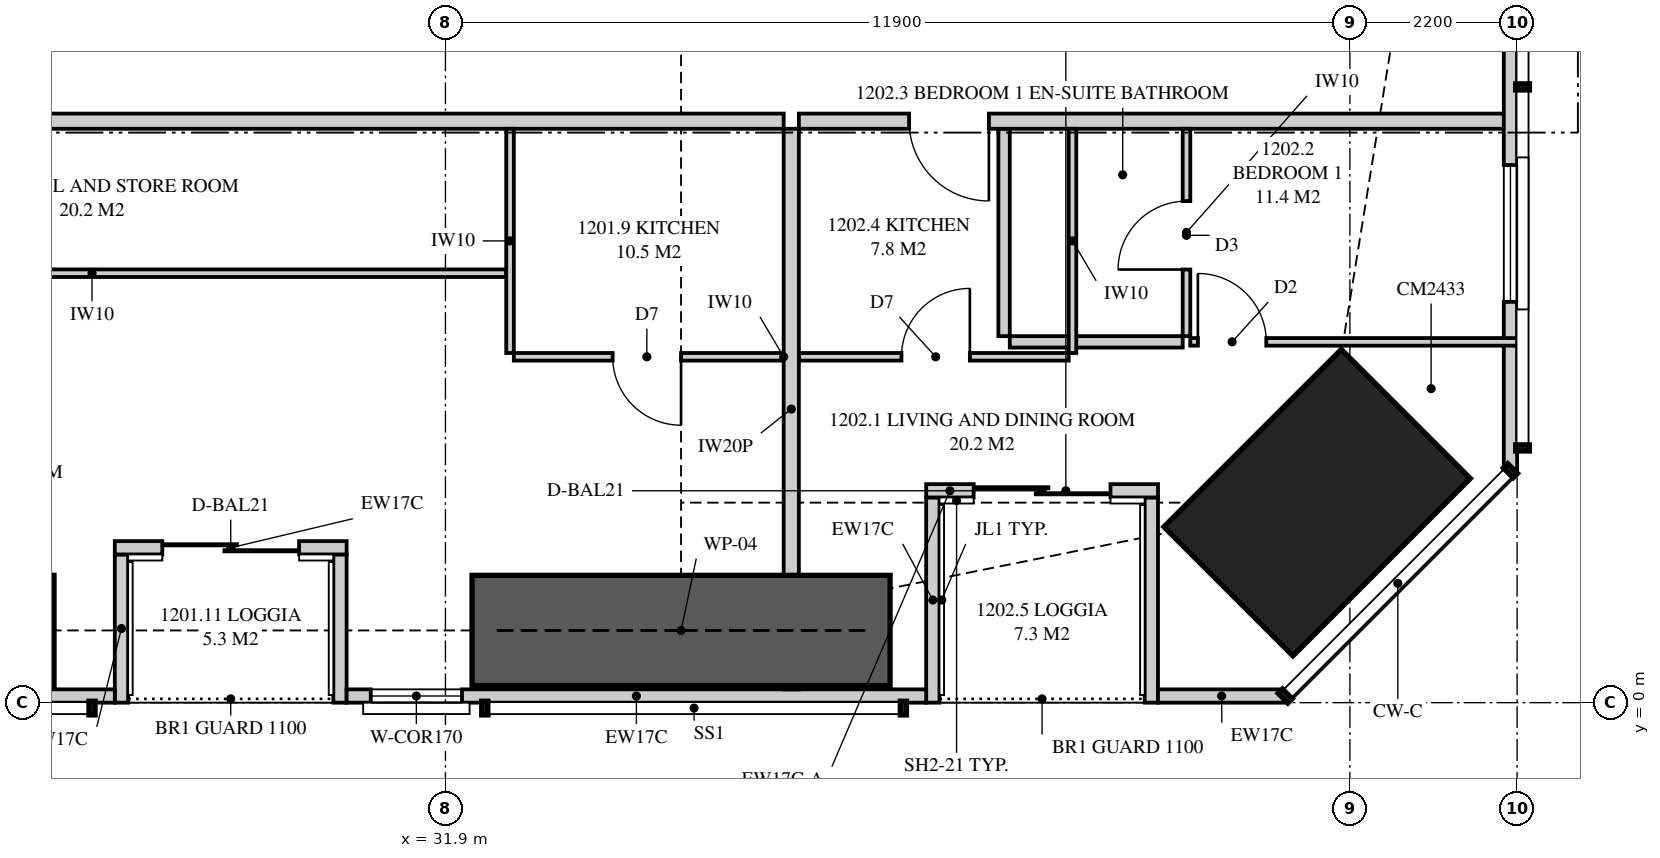
"""IFC4 building model, lengths in metres.
Left out: names, types, materials, properties, quantities, classifications, styles, units other than length and angle.
Written with IfcOpenShell. Run it as: python <this file> out.ifc"""

import sys

from ifc_helpers import new_model, si_unit, direction, frame, frame_2d, origin, origin_2d, place, context, subcontext, project, spatial, polyline, rectangle, outline, extrude, element, fill, save


model = new_model("IFC4")
c1 = context("Model", 3, precision=1e-05, world=origin(), true_north=direction((0.0, 1.0)))
c2 = subcontext(c1, "Body", "Model", "MODEL_VIEW")
j1 = project(units=[si_unit("LENGTHUNIT", "METRE"), si_unit("PLANEANGLEUNIT", "RADIAN")], contexts=[c1])
p1 = place(None, origin())
s1 = spatial("IfcSite", under=j1, at=p1, CompositionType="ELEMENT")
p2 = place(p1, origin())
s2 = spatial("IfcBuilding", under=s1, at=p2, CompositionType="ELEMENT")
p3 = place(p2, frame((0.0, 0.0, 47.8)))
s3 = spatial("IfcBuildingStorey", under=s2, at=p3, CompositionType="ELEMENT", Elevation=47.8)
p4 = place(p3, frame((43.369, 2.631, 0.0), z_axis=(0.0, 0.0, 1.0), x_axis=(-0.707106781187, 0.707106781187, 0.0)))
e1 = element("IfcColumn", 1, at=p4, inside=s3, PredefinedType="COLUMN", context=c2, shape_type="SweptSolid", body=[
    extrude(rectangle(XDim=2.4, YDim=3.3, at=origin_2d()), origin(), (0.0, 0.0, 1.0), 3.35),
])
p5 = place(p3, frame((5.051, 0.087, 0.0), z_axis=(0.0, 0.0, 1.0), x_axis=(1.0, 0.0, 0.0)))
e2 = element("IfcWall", 2, at=p5, inside=s3, PredefinedType="SOLIDWALL", context=c2, shape_type="SweptSolid", body=[
    extrude(outline(polyline([(0.0, 0.0), (22.499, 0.0), (22.499, 2.15), (7.949, 2.15), (7.949, 3.11), (7.793, 3.11), (7.793, 2.15), (7.745, 2.15), (7.745, 3.11), (0.0, 3.11), (0.0, 0.0)])), frame((0.0, 0.087, 0.0), z_axis=(0.0, -1.0, 0.0), x_axis=(1.0, 0.0, 0.0)), (0.0, 0.0, 1.0), 0.175),
])
p6 = place(p5, frame((3.234, 0.0, 0.4)))
e3 = element("IfcOpeningElement", 3, at=p6, cuts=e2, PredefinedType="OPENING", context=c2, shape_type="SweptSolid", body=[
    extrude(rectangle(XDim=1.8, YDim=1.7, at=frame_2d((0.9, 0.85))), frame((0.0, 0.097, 0.0), z_axis=(0.0, -1.0, 0.0), x_axis=(1.0, 0.0, 0.0)), (0.0, 0.0, 1.0), 0.195),
])
p7 = place(p5, frame((10.806, 0.0, 0.4)))
e4 = element("IfcOpeningElement", 4, at=p7, cuts=e2, PredefinedType="OPENING", context=c2, shape_type="SweptSolid", body=[
    extrude(rectangle(XDim=1.8, YDim=1.7, at=frame_2d((0.9, 0.85))), frame((0.0, 0.097, 0.0), z_axis=(0.0, -1.0, 0.0), x_axis=(1.0, 0.0, 0.0)), (0.0, 0.0, 1.0), 0.195),
])
p8 = place(p5, frame((13.974, 0.0, 0.4)))
e5 = element("IfcOpeningElement", 5, at=p8, cuts=e2, PredefinedType="OPENING", context=c2, shape_type="SweptSolid", body=[
    extrude(rectangle(XDim=1.8, YDim=1.7, at=frame_2d((0.9, 0.85))), frame((0.0, 0.097, 0.0), z_axis=(0.0, -1.0, 0.0), x_axis=(1.0, 0.0, 0.0)), (0.0, 0.0, 1.0), 0.195),
])
p9 = place(p3, frame((30.6, 0.087, 0.0), z_axis=(0.0, 0.0, 1.0), x_axis=(1.0, 0.0, 0.0)))
e6 = element("IfcWall", 6, at=p9, inside=s3, PredefinedType="SOLIDWALL", context=c2, shape_type="SweptSolid", body=[
    extrude(outline(polyline([(0.0, 0.0), (7.625, 0.0), (7.625, 3.11), (4.604, 3.11), (4.604, 2.15), (4.556, 2.15), (4.556, 3.11), (4.4, 3.11), (4.4, 2.15), (0.0, 2.15), (0.0, 0.0)])), frame((0.0, 0.087, 0.0), z_axis=(0.0, -1.0, 0.0), x_axis=(1.0, 0.0, 0.0)), (0.0, 0.0, 1.0), 0.175),
])
p10 = place(p9, frame((0.317, 0.0, 0.4)))
e7 = element("IfcOpeningElement", 7, at=p10, cuts=e6, PredefinedType="OPENING", context=c2, shape_type="SweptSolid", body=[
    extrude(rectangle(XDim=1.2, YDim=1.7, at=frame_2d((0.6, 0.85))), frame((0.0, 0.097, 0.0), z_axis=(0.0, -1.0, 0.0), x_axis=(1.0, 0.0, 0.0)), (0.0, 0.0, 1.0), 0.195),
])
p11 = place(p3, frame((41.275, 0.087, 0.0), z_axis=(0.0, 0.0, 1.0), x_axis=(1.0, 0.0, 0.0)))
e8 = element("IfcWall", 8, at=p11, inside=s3, PredefinedType="SOLIDWALL", context=c2, shape_type="SweptSolid", body=[
    extrude(rectangle(XDim=1.674, YDim=0.175, at=frame_2d((0.837, 0.0))), origin(), (0.0, 0.0, 1.0), 3.11),
])
p12 = place(p3, frame((27.55, 2.038, 0.0), z_axis=(0.0, 0.0, 1.0), x_axis=(1.0, 0.0, 0.0)))
e9 = element("IfcWall", 9, at=p12, inside=s3, PredefinedType="SOLIDWALL", context=c2, shape_type="SweptSolid", body=[
    extrude(rectangle(XDim=3.05, YDim=0.175, at=frame_2d((1.525, 0.0))), origin(), (0.0, 0.0, 1.0), 3.11),
])
p13 = place(p12, frame((0.625, 0.0, 0.0)))
e10 = element("IfcOpeningElement", 10, at=p13, cuts=e9, PredefinedType="OPENING", context=c2, shape_type="SweptSolid", body=[
    extrude(rectangle(XDim=1.8, YDim=2.1, at=frame_2d((0.9, 1.05))), frame((0.0, 0.097, 0.0), z_axis=(0.0, -1.0, 0.0), x_axis=(1.0, 0.0, 0.0)), (0.0, 0.0, 1.0), 0.195),
])
for number, where, z_axis, x_axis in (
    (11, (27.637, 0.0, 0.0), (0.0, 0.0, 1.0), (0.0, 1.0, 0.0)),
    (12, (30.512, 0.0, 0.0), (0.0, 0.0, 1.0), (0.0, 1.0, 0.0)),
):
    element("IfcWall", number, at=place(p3, frame(where, z_axis=z_axis, x_axis=x_axis)), inside=s3, PredefinedType="SOLIDWALL", context=c2, shape_type="SweptSolid", body=[
        extrude(outline(polyline([(0.0, 0.0), (1.95, 0.0), (1.95, 3.11), (1.75, 3.11), (1.75, 2.15), (0.15, 2.15), (0.15, 3.11), (0.0, 3.11), (0.0, 0.0)])), frame((0.0, 0.087, 0.0), z_axis=(0.0, -1.0, 0.0), x_axis=(1.0, 0.0, 0.0)), (0.0, 0.0, 1.0), 0.175),
    ])
p14 = place(p3, frame((38.225, 2.788, 0.0), z_axis=(0.0, 0.0, 1.0), x_axis=(1.0, 0.0, 0.0)))
e13 = element("IfcWall", 13, at=p14, inside=s3, PredefinedType="SOLIDWALL", context=c2, shape_type="SweptSolid", body=[
    extrude(rectangle(XDim=0.625, YDim=0.175, at=frame_2d((0.312, 0.0))), origin(), (0.0, 0.0, 1.0), 2.51),
])
p15 = place(p3, frame((38.85, 2.788, 0.0), z_axis=(0.0, 0.0, 1.0), x_axis=(1.0, 0.0, 0.0)))
e14 = element("IfcWall", 14, at=p15, inside=s3, PredefinedType="SOLIDWALL", context=c2, shape_type="SweptSolid", body=[
    extrude(rectangle(XDim=2.425, YDim=0.175, at=frame_2d((1.212, 0.0))), origin(), (0.0, 0.0, 1.0), 2.15),
])
p16 = place(p15, origin())
e15 = element("IfcOpeningElement", 15, at=p16, cuts=e14, PredefinedType="OPENING", context=c2, shape_type="SweptSolid", body=[
    extrude(rectangle(XDim=1.8, YDim=2.1, at=frame_2d((0.9, 1.05))), frame((0.0, 0.097, 0.0), z_axis=(0.0, -1.0, 0.0), x_axis=(1.0, 0.0, 0.0)), (0.0, 0.0, 1.0), 0.195),
])
p17 = place(p3, frame((38.312, 0.0, 0.0), z_axis=(0.0, 0.0, 1.0), x_axis=(0.0, 1.0, 0.0)))
e16 = element("IfcWall", 16, at=p17, inside=s3, PredefinedType="SOLIDWALL", context=c2, shape_type="SweptSolid", body=[
    extrude(outline(polyline([(0.0, 0.0), (2.7, 0.0), (2.7, 2.51), (2.449, 2.51), (2.449, 2.15), (0.782, 2.15), (0.782, 3.11), (0.0, 3.11), (0.0, 0.0)])), frame((0.0, 0.087, 0.0), z_axis=(0.0, -1.0, 0.0), x_axis=(1.0, 0.0, 0.0)), (0.0, 0.0, 1.0), 0.175),
])
p18 = place(p3, frame((41.188, 0.0, 0.0), z_axis=(0.0, 0.0, 1.0), x_axis=(0.0, 1.0, 0.0)))
e17 = element("IfcWall", 17, at=p18, inside=s3, PredefinedType="SOLIDWALL", context=c2, shape_type="SweptSolid", body=[
    extrude(outline(polyline([(0.0, 0.0), (2.7, 0.0), (2.7, 2.15), (1.36, 2.15), (1.36, 3.11), (0.0, 3.11), (0.0, 0.0)])), frame((0.0, 0.087, 0.0), z_axis=(0.0, -1.0, 0.0), x_axis=(1.0, 0.0, 0.0)), (0.0, 0.0, 1.0), 0.175),
])
p19 = place(p3, frame((45.913, 3.051, 0.0), z_axis=(0.0, 0.0, 1.0), x_axis=(0.0, 1.0, 0.0)))
e18 = element("IfcWall", 18, at=p19, inside=s3, PredefinedType="SOLIDWALL", context=c2, shape_type="SweptSolid", body=[
    extrude(outline(polyline([(0.0, 0.0), (31.897, 0.0), (31.897, 3.11), (22.167, 3.11), (22.167, 2.15), (22.074, 2.15), (22.074, 3.11), (21.949, 3.11), (21.949, 2.15), (9.949, 2.15), (9.949, 3.11), (9.823, 3.11), (9.823, 2.15), (9.73, 2.15), (9.73, 3.11), (0.0, 3.11), (0.0, 0.0)])), frame((0.0, 0.087, 0.0), z_axis=(0.0, -1.0, 0.0), x_axis=(1.0, 0.0, 0.0)), (0.0, 0.0, 1.0), 0.175),
])
p20 = place(p19, frame((2.222, 0.0, 0.4)))
e19 = element("IfcOpeningElement", 19, at=p20, cuts=e18, PredefinedType="OPENING", context=c2, shape_type="SweptSolid", body=[
    extrude(rectangle(XDim=1.8, YDim=1.7, at=frame_2d((0.9, 0.85))), frame((0.0, 0.097, 0.0), z_axis=(0.0, -1.0, 0.0), x_axis=(1.0, 0.0, 0.0)), (0.0, 0.0, 1.0), 0.195),
])
p21 = place(p19, frame((14.849, 0.0, 0.4)))
e20 = element("IfcOpeningElement", 20, at=p21, cuts=e18, PredefinedType="OPENING", context=c2, shape_type="SweptSolid", body=[
    extrude(rectangle(XDim=1.2, YDim=1.7, at=frame_2d((0.6, 0.85))), frame((0.0, 0.097, 0.0), z_axis=(0.0, -1.0, 0.0), x_axis=(1.0, 0.0, 0.0)), (0.0, 0.0, 1.0), 0.195),
])
p22 = place(p19, frame((27.375, 0.0, 0.4)))
e21 = element("IfcOpeningElement", 21, at=p22, cuts=e18, PredefinedType="OPENING", context=c2, shape_type="SweptSolid", body=[
    extrude(rectangle(XDim=1.8, YDim=1.7, at=frame_2d((0.9, 0.85))), frame((0.0, 0.097, 0.0), z_axis=(0.0, -1.0, 0.0), x_axis=(1.0, 0.0, 0.0)), (0.0, 0.0, 1.0), 0.195),
])
p23 = place(p3, frame((36.45, 0.175, 0.0), z_axis=(0.0, 0.0, 1.0), x_axis=(0.0, 1.0, 0.0)))
e22 = element("IfcWall", 22, at=p23, inside=s3, PredefinedType="PARTITIONING", context=c2, shape_type="SweptSolid", body=[
    extrude(outline(polyline([(0.138, 3.11), (0.0, 3.11), (0.0, 0.0), (0.529, 0.0), (0.529, 0.504), (1.021, 0.504), (1.021, 0.0), (7.375, 0.0), (7.375, 3.11), (3.766, 3.11), (3.766, 2.51), (1.994, 2.51), (1.994, 2.15), (1.021, 2.15), (1.021, 1.646), (0.529, 1.646), (0.529, 2.15), (0.138, 2.15), (0.138, 3.11)])), frame((0.0, 0.1, 0.0), z_axis=(0.0, -1.0, 0.0), x_axis=(1.0, 0.0, 0.0)), (0.0, 0.0, 1.0), 0.2),
])
p24 = place(p3, frame((17.725, 7.65, 0.0), z_axis=(0.0, 0.0, 1.0), x_axis=(1.0, 0.0, 0.0)))
e23 = element("IfcWall", 23, at=p24, inside=s3, PredefinedType="PARTITIONING", context=c2, shape_type="SweptSolid", body=[
    extrude(outline(polyline([(0.0, 0.0), (18.625, 0.0), (18.625, 3.11), (17.612, 3.11), (17.612, 2.541), (16.938, 2.541), (16.938, 3.11), (6.612, 3.11), (6.612, 2.541), (5.938, 2.541), (5.938, 3.11), (0.0, 3.11), (0.0, 0.0)])), frame((0.0, 0.1, 0.0), z_axis=(0.0, -1.0, 0.0), x_axis=(1.0, 0.0, 0.0)), (0.0, 0.0, 1.0), 0.2),
])
p25 = place(p24, frame((1.0, 0.0, 0.0)))
e24 = element("IfcOpeningElement", 24, at=p25, cuts=e23, PredefinedType="OPENING", context=c2, shape_type="SweptSolid", body=[
    extrude(rectangle(XDim=1.05, YDim=2.2, at=frame_2d((0.525, 1.1))), frame((0.0, 0.11, 0.0), z_axis=(0.0, -1.0, 0.0), x_axis=(1.0, 0.0, 0.0)), (0.0, 0.0, 1.0), 0.22),
])
p26 = place(p3, frame((32.8, 4.55, 0.0), z_axis=(0.0, 0.0, 1.0), x_axis=(1.0, 0.0, 0.0)))
e25 = element("IfcWall", 25, at=p26, inside=s3, PredefinedType="PARTITIONING", context=c2, shape_type="SweptSolid", body=[
    extrude(outline(polyline([(0.0, 0.0), (3.55, 0.0), (3.55, 3.11), (2.487, 3.11), (2.487, 2.541), (1.913, 2.541), (1.913, 3.11), (0.0, 3.11), (0.0, 0.0)])), frame((0.0, 0.05, 0.0), z_axis=(0.0, -1.0, 0.0), x_axis=(1.0, 0.0, 0.0)), (0.0, 0.0, 1.0), 0.1),
])
p27 = place(p26, frame((1.3, 0.0, 0.0)))
e26 = element("IfcOpeningElement", 26, at=p27, cuts=e25, PredefinedType="OPENING", context=c2, shape_type="SweptSolid", body=[
    extrude(rectangle(XDim=0.9, YDim=2.1, at=frame_2d((0.45, 1.05))), frame((0.0, 0.06, 0.0), z_axis=(0.0, -1.0, 0.0), x_axis=(1.0, 0.0, 0.0)), (0.0, 0.0, 1.0), 0.12),
])
p28 = place(p3, frame((32.75, 4.6, 0.0), z_axis=(0.0, 0.0, 1.0), x_axis=(0.0, 1.0, 0.0)))
e27 = element("IfcWall", 27, at=p28, inside=s3, PredefinedType="PARTITIONING", context=c2, shape_type="SweptSolid", body=[
    extrude(rectangle(XDim=2.95, YDim=0.1, at=frame_2d((1.475, 0.0))), origin(), (0.0, 0.0, 1.0), 3.11),
])
p29 = place(p3, frame((21.8, 5.65, 0.0), z_axis=(0.0, 0.0, 1.0), x_axis=(1.0, 0.0, 0.0)))
e28 = element("IfcWall", 28, at=p29, inside=s3, PredefinedType="PARTITIONING", context=c2, shape_type="SweptSolid", body=[
    extrude(outline(polyline([(0.0, 0.0), (10.9, 0.0), (10.9, 3.11), (2.487, 3.11), (2.487, 2.541), (1.913, 2.541), (1.913, 3.11), (0.0, 3.11), (0.0, 0.0)])), frame((0.0, 0.05, 0.0), z_axis=(0.0, -1.0, 0.0), x_axis=(1.0, 0.0, 0.0)), (0.0, 0.0, 1.0), 0.1),
])
p30 = place(p29, frame((0.3, 0.0, 0.0)))
e29 = element("IfcOpeningElement", 29, at=p30, cuts=e28, PredefinedType="OPENING", context=c2, shape_type="SweptSolid", body=[
    extrude(rectangle(XDim=1.0, YDim=2.1, at=frame_2d((0.5, 1.05))), frame((0.0, 0.06, 0.0), z_axis=(0.0, -1.0, 0.0), x_axis=(1.0, 0.0, 0.0)), (0.0, 0.0, 1.0), 0.12),
])
p31 = place(p3, frame((36.55, 7.65, 0.0), z_axis=(0.0, 0.0, 1.0), x_axis=(1.0, 0.0, 0.0)))
e30 = element("IfcWall", 30, at=p31, inside=s3, PredefinedType="PARTITIONING", context=c2, shape_type="SweptSolid", body=[
    extrude(outline(polyline([(0.0, 0.0), (9.45, 0.0), (9.45, 3.11), (8.554, 3.11), (8.554, 2.15), (6.71, 2.15), (6.71, 3.11), (0.0, 3.11), (0.0, 0.0)])), frame((0.0, 0.1, 0.0), z_axis=(0.0, -1.0, 0.0), x_axis=(1.0, 0.0, 0.0)), (0.0, 0.0, 1.0), 0.2),
])
p32 = place(p31, frame((1.45, 0.0, 0.0)))
e31 = element("IfcOpeningElement", 31, at=p32, cuts=e30, PredefinedType="OPENING", context=c2, shape_type="SweptSolid", body=[
    extrude(rectangle(XDim=1.05, YDim=2.2, at=frame_2d((0.525, 1.1))), frame((0.0, 0.11, 0.0), z_axis=(0.0, -1.0, 0.0), x_axis=(1.0, 0.0, 0.0)), (0.0, 0.0, 1.0), 0.22),
])
p33 = place(p3, frame((41.65, 4.822, 0.0), z_axis=(0.0, 0.0, 1.0), x_axis=(0.0, 1.0, 0.0)))
e32 = element("IfcWall", 32, at=p33, inside=s3, PredefinedType="PARTITIONING", context=c2, shape_type="SweptSolid", body=[
    extrude(rectangle(XDim=2.728, YDim=0.1, at=frame_2d((1.364, 0.0))), origin(), (0.0, 0.0, 1.0), 3.11),
])
p34 = place(p33, frame((0.877, 0.0, 0.0)))
e33 = element("IfcOpeningElement", 33, at=p34, cuts=e32, PredefinedType="OPENING", context=c2, shape_type="SweptSolid", body=[
    extrude(rectangle(XDim=0.9, YDim=2.1, at=frame_2d((0.45, 1.05))), frame((0.0, 0.06, 0.0), z_axis=(0.0, -1.0, 0.0), x_axis=(1.0, 0.0, 0.0)), (0.0, 0.0, 1.0), 0.12),
])
p35 = place(p3, frame((41.7, 4.747, 0.0), z_axis=(0.0, 0.0, 1.0), x_axis=(1.0, 0.0, 0.0)))
e34 = element("IfcWall", 34, at=p35, inside=s3, PredefinedType="PARTITIONING", context=c2, shape_type="SweptSolid", body=[
    extrude(outline(polyline([(0.0, 0.0), (4.3, 0.0), (4.3, 3.11), (2.883, 3.11), (2.883, 2.15), (1.14, 2.15), (1.14, 3.11), (0.0, 3.11), (0.0, 0.0)])), frame((0.0, 0.05, 0.0), z_axis=(0.0, -1.0, 0.0), x_axis=(1.0, 0.0, 0.0)), (0.0, 0.0, 1.0), 0.1),
])
p36 = place(p35, frame((0.1, 0.0, 0.0)))
e35 = element("IfcOpeningElement", 35, at=p36, cuts=e34, PredefinedType="OPENING", context=c2, shape_type="SweptSolid", body=[
    extrude(rectangle(XDim=0.9, YDim=2.1, at=frame_2d((0.45, 1.05))), frame((0.0, 0.06, 0.0), z_axis=(0.0, -1.0, 0.0), x_axis=(1.0, 0.0, 0.0)), (0.0, 0.0, 1.0), 0.12),
])
p37 = place(p3, frame((39.325, 4.747, 0.0), z_axis=(0.0, 0.0, 1.0), x_axis=(1.0, 0.0, 0.0)))
e36 = element("IfcWall", 36, at=p37, inside=s3, PredefinedType="PLUMBINGWALL", context=c2, shape_type="SweptSolid", body=[
    extrude(rectangle(XDim=2.275, YDim=0.15, at=frame_2d((1.138, 0.0))), origin(), (0.0, 0.0, 1.0), 3.11),
])
p38 = place(p3, frame((39.25, 4.822, 0.0), z_axis=(0.0, 0.0, 1.0), x_axis=(0.0, 1.0, 0.0)))
e37 = element("IfcWall", 37, at=p38, inside=s3, PredefinedType="PLUMBINGWALL", context=c2, shape_type="SweptSolid", body=[
    extrude(rectangle(XDim=2.728, YDim=0.15, at=frame_2d((1.364, 0.0))), origin(), (0.0, 0.0, 1.0), 3.11),
])
p39 = place(p3, frame((36.55, 4.55, 0.0), z_axis=(0.0, 0.0, 1.0), x_axis=(1.0, 0.0, 0.0)))
e38 = element("IfcWall", 38, at=p39, inside=s3, PredefinedType="PARTITIONING", context=c2, shape_type="SweptSolid", body=[
    extrude(rectangle(XDim=3.55, YDim=0.1, at=frame_2d((1.775, 0.0))), origin(), (0.0, 0.0, 1.0), 3.11),
])
p40 = place(p39, frame((1.35, 0.0, 0.0)))
e39 = element("IfcOpeningElement", 39, at=p40, cuts=e38, PredefinedType="OPENING", context=c2, shape_type="SweptSolid", body=[
    extrude(rectangle(XDim=0.9, YDim=2.1, at=frame_2d((0.45, 1.05))), frame((0.0, 0.06, 0.0), z_axis=(0.0, -1.0, 0.0), x_axis=(1.0, 0.0, 0.0)), (0.0, 0.0, 1.0), 0.12),
])
p41 = place(p3, frame((40.15, 4.6, 0.0), z_axis=(0.0, 0.0, 1.0), x_axis=(0.0, 1.0, 0.0)))
e40 = element("IfcWall", 40, at=p41, inside=s3, PredefinedType="PARTITIONING", context=c2, shape_type="SweptSolid", body=[
    extrude(rectangle(XDim=2.95, YDim=0.1, at=frame_2d((1.475, 0.0))), origin(), (0.0, 0.0, 1.0), 3.11),
])
for number, where, z_axis, x_axis in (
    (41, (21.25, 0.95, 0.0), (0.0, 0.0, 1.0), (1.0, 0.0, 0.0)),
    (42, (32.25, 0.95, 0.0), (0.0, 0.0, 1.0), (1.0, 0.0, 0.0)),
):
    element("IfcWall", number, at=place(p3, frame(where, z_axis=z_axis, x_axis=x_axis)), inside=s3, PredefinedType="SHEAR", context=c2, shape_type="SweptSolid", body=[
        extrude(rectangle(XDim=5.5, YDim=1.45, at=frame_2d((2.75, 0.0))), origin(), (0.0, 0.0, 1.0), 3.35),
    ])
p42 = place(p13, origin())
e43 = element("IfcDoor", 43, at=p42, inside=s3, OperationType="SLIDING_TO_LEFT", PredefinedType="DOOR", context=c2, shape_type="SweptSolid", body=[
    extrude(rectangle(XDim=1.8, YDim=2.1, at=frame_2d((0.9, 1.05))), frame((0.0, 0.025, 0.0), z_axis=(0.0, -1.0, 0.0), x_axis=(1.0, 0.0, 0.0)), (0.0, 0.0, 1.0), 0.05),
])
fill(e10, e43)
p43 = place(p10, origin())
e44 = element("IfcWindow", 44, at=p43, inside=s3, PartitioningType="SINGLE_PANEL", PredefinedType="WINDOW", context=c2, shape_type="SweptSolid", body=[
    extrude(rectangle(XDim=1.2, YDim=1.7, at=frame_2d((0.6, 0.85))), frame((0.0, 0.03, 0.0), z_axis=(0.0, -1.0, 0.0), x_axis=(1.0, 0.0, 0.0)), (0.0, 0.0, 1.0), 0.06),
])
fill(e7, e44)
p44 = place(p16, origin())
e45 = element("IfcDoor", 45, at=p44, inside=s3, OperationType="SLIDING_TO_LEFT", PredefinedType="DOOR", context=c2, shape_type="SweptSolid", body=[
    extrude(rectangle(XDim=1.8, YDim=2.1, at=frame_2d((0.9, 1.05))), frame((0.0, 0.025, 0.0), z_axis=(0.0, -1.0, 0.0), x_axis=(1.0, 0.0, 0.0)), (0.0, 0.0, 1.0), 0.05),
])
fill(e15, e45)
p45 = place(p20, origin())
e46 = element("IfcWindow", 46, at=p45, inside=s3, PartitioningType="SINGLE_PANEL", PredefinedType="WINDOW", context=c2, shape_type="SweptSolid", body=[
    extrude(rectangle(XDim=1.8, YDim=1.7, at=frame_2d((0.9, 0.85))), frame((0.0, 0.03, 0.0), z_axis=(0.0, -1.0, 0.0), x_axis=(1.0, 0.0, 0.0)), (0.0, 0.0, 1.0), 0.06),
])
fill(e19, e46)
p46 = place(p27, frame((0.9, 0.0, 0.0), z_axis=(0.0, 0.0, 1.0), x_axis=(-1.0, 0.0, 0.0)))
e47 = element("IfcDoor", 47, at=p46, inside=s3, OperationType="SINGLE_SWING_LEFT", PredefinedType="DOOR", context=c2, shape_type="SweptSolid", body=[
    extrude(rectangle(XDim=0.9, YDim=2.1, at=frame_2d((0.45, 1.05))), frame((0.0, 0.025, 0.0), z_axis=(0.0, -1.0, 0.0), x_axis=(1.0, 0.0, 0.0)), (0.0, 0.0, 1.0), 0.05),
])
fill(e26, e47)
p47 = place(p32, frame((1.05, 0.0, 0.0), z_axis=(0.0, 0.0, 1.0), x_axis=(-1.0, 0.0, 0.0)))
e48 = element("IfcDoor", 48, at=p47, inside=s3, OperationType="SINGLE_SWING_LEFT", PredefinedType="DOOR", context=c2, shape_type="SweptSolid", body=[
    extrude(rectangle(XDim=1.05, YDim=2.2, at=frame_2d((0.525, 1.1))), frame((0.0, 0.025, 0.0), z_axis=(0.0, -1.0, 0.0), x_axis=(1.0, 0.0, 0.0)), (0.0, 0.0, 1.0), 0.05),
])
fill(e31, e48)
p48 = place(p36, origin())
e49 = element("IfcDoor", 49, at=p48, inside=s3, OperationType="SINGLE_SWING_LEFT", PredefinedType="DOOR", context=c2, shape_type="SweptSolid", body=[
    extrude(rectangle(XDim=0.9, YDim=2.1, at=frame_2d((0.45, 1.05))), frame((0.0, 0.025, 0.0), z_axis=(0.0, -1.0, 0.0), x_axis=(1.0, 0.0, 0.0)), (0.0, 0.0, 1.0), 0.05),
])
fill(e35, e49)
p49 = place(p34, origin())
e50 = element("IfcDoor", 50, at=p49, inside=s3, OperationType="SINGLE_SWING_LEFT", PredefinedType="DOOR", context=c2, shape_type="SweptSolid", body=[
    extrude(rectangle(XDim=0.9, YDim=2.1, at=frame_2d((0.45, 1.05))), frame((0.0, 0.025, 0.0), z_axis=(0.0, -1.0, 0.0), x_axis=(1.0, 0.0, 0.0)), (0.0, 0.0, 1.0), 0.05),
])
fill(e33, e50)
p50 = place(p40, origin())
e51 = element("IfcDoor", 51, at=p50, inside=s3, OperationType="SINGLE_SWING_RIGHT", PredefinedType="DOOR", context=c2, shape_type="SweptSolid", body=[
    extrude(rectangle(XDim=0.9, YDim=2.1, at=frame_2d((0.45, 1.05))), frame((0.0, 0.025, 0.0), z_axis=(0.0, -1.0, 0.0), x_axis=(1.0, 0.0, 0.0)), (0.0, 0.0, 1.0), 0.05),
])
fill(e39, e51)
save(model, sys.argv[1])
